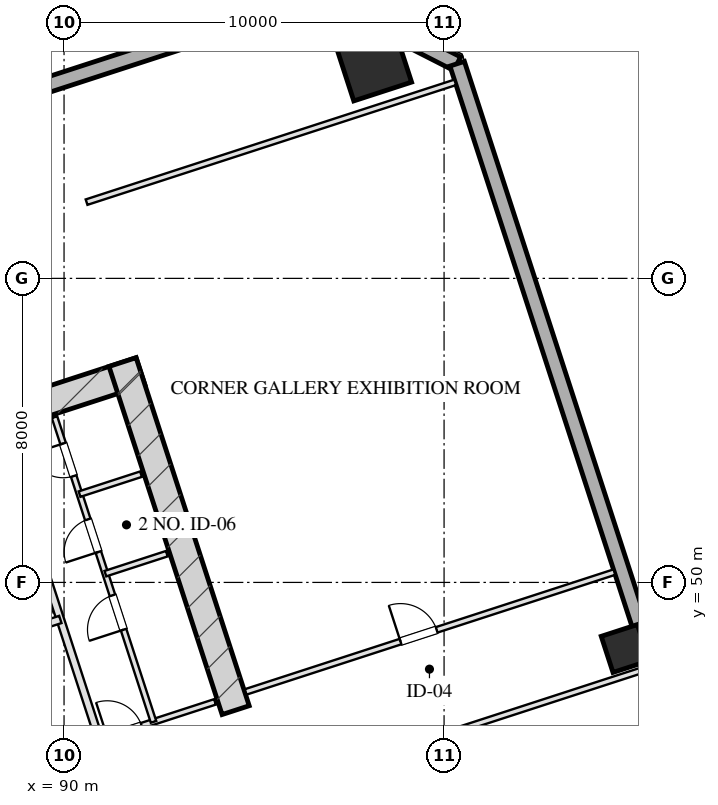
"""IFC4 building model, lengths in metres.
Left out: names, types, materials, properties, quantities, classifications, styles, units other than length and angle.
Written with IfcOpenShell. Run it as: python <this file> out.ifc"""

import sys

from ifc_helpers import new_model, si_unit, direction, frame, frame_2d, origin, origin_2d, place, context, subcontext, project, spatial, rectangle, hollow_rectangle, extrude, element, fill, save


model = new_model("IFC4")
c1 = context("Model", 3, precision=1e-05, world=origin(), true_north=direction((0.0, 1.0)))
c2 = subcontext(c1, "Body", "Model", "MODEL_VIEW")
j1 = project(units=[si_unit("LENGTHUNIT", "METRE"), si_unit("PLANEANGLEUNIT", "RADIAN")], contexts=[c1])
p1 = place(None, origin())
s1 = spatial("IfcSite", under=j1, at=p1, CompositionType="ELEMENT")
p2 = place(p1, origin())
s2 = spatial("IfcBuilding", under=s1, at=p2, CompositionType="ELEMENT")
p3 = place(p2, frame((0.0, 0.0, 30.0)))
s3 = spatial("IfcBuildingStorey", under=s2, at=p3, CompositionType="ELEMENT", Elevation=30.0)
p4 = place(p3, frame((76.272, 50.443, 0.0), z_axis=(0.0, 0.0, 1.0), x_axis=(0.951056072937, 0.309018358888, 0.0)))
e1 = element("IfcWall", 1, at=p4, inside=s3, PredefinedType="SHEAR", context=c2, shape_type="SweptSolid", body=[
    extrude(rectangle(XDim=16.55, YDim=0.75, at=frame_2d((8.275, 0.0))), origin(), (0.0, 0.0, 1.0), 4.0),
])
p5 = place(p3, frame((94.515, 46.639, 0.0), z_axis=(0.0, 0.0, 1.0), x_axis=(-0.309016134813, 0.951056795583, 0.0)))
e2 = element("IfcWall", 2, at=p5, inside=s3, PredefinedType="SHEAR", context=c2, shape_type="SweptSolid", body=[
    extrude(rectangle(XDim=9.63, YDim=0.75, at=frame_2d((4.815, 0.0))), origin(), (0.0, 0.0, 1.0), 4.0),
])
p6 = place(p3, frame((98.137, 63.677, 0.0), z_axis=(0.0, 0.0, 1.0), x_axis=(0.951056516295, 0.309016994375, 0.0)))
e3 = element("IfcColumn", 3, at=p6, inside=s3, PredefinedType="COLUMN", context=c2, shape_type="SweptSolid", body=[
    extrude(hollow_rectangle(XDim=1.6, YDim=1.6, WallThickness=0.055, at=origin_2d()), origin(), (0.0, 0.0, 1.0), 4.001),
])
p7 = place(p3, frame((104.766, 48.261, 0.0), z_axis=(0.0, 0.0, 1.0), x_axis=(0.951056516295, 0.309016994375, 0.0)))
e4 = element("IfcColumn", 4, at=p7, inside=s3, PredefinedType="COLUMN", context=c2, shape_type="SweptSolid", body=[
    extrude(hollow_rectangle(XDim=1.0, YDim=1.0, WallThickness=0.036, at=origin_2d()), origin(), (0.0, 0.0, 1.0), 4.001),
])
p8 = place(p3, frame((66.002, 55.433, 0.0), z_axis=(0.0, 0.0, 1.0), x_axis=(0.951055939317, 0.309018770125, 0.0)))
e5 = element("IfcWall", 5, at=p8, inside=s3, PredefinedType="SOLIDWALL", context=c2, shape_type="SweptSolid", body=[
    extrude(rectangle(XDim=32.4, YDim=0.4, at=frame_2d((16.2, 0.0))), origin(), (0.0, 0.0, 1.0), 3.16),
])
p9 = place(p3, frame((96.816, 65.446, 0.0), z_axis=(0.0, 0.0, 1.0), x_axis=(0.890998089617, -0.454007053137, 0.0)))
e6 = element("IfcWall", 6, at=p9, inside=s3, PredefinedType="SOLIDWALL", context=c2, shape_type="SweptSolid", body=[
    extrude(rectangle(XDim=3.96, YDim=0.4, at=frame_2d((1.98, 0.0))), origin(), (0.0, 0.0, 1.0), 3.16),
])
p10 = place(p3, frame((100.345, 63.648, 0.0), z_axis=(0.0, 0.0, 1.0), x_axis=(0.309014526607, -0.951057318118, 0.0)))
e7 = element("IfcWall", 7, at=p10, inside=s3, PredefinedType="SOLIDWALL", context=c2, shape_type="SweptSolid", body=[
    extrude(rectangle(XDim=50.0, YDim=0.4, at=frame_2d((25.0, 0.0))), origin(), (0.0, 0.0, 1.0), 3.16),
])
p11 = place(p10, frame((30.15, 0.0, 0.75)))
e8 = element("IfcOpeningElement", 8, at=p11, cuts=e7, PredefinedType="OPENING", context=c2, shape_type="SweptSolid", body=[
    extrude(rectangle(XDim=2.5, YDim=1.75, at=frame_2d((1.25, 0.875))), frame((0.0, 0.21, 0.0), z_axis=(0.0, -1.0, 0.0), x_axis=(1.0, 0.0, 0.0)), (0.0, 0.0, 1.0), 0.42),
])
p12 = place(p10, frame((21.15, 0.0, 0.75)))
e9 = element("IfcOpeningElement", 9, at=p12, cuts=e7, PredefinedType="OPENING", context=c2, shape_type="SweptSolid", body=[
    extrude(rectangle(XDim=2.5, YDim=1.75, at=frame_2d((1.25, 0.875))), frame((0.0, 0.21, 0.0), z_axis=(0.0, -1.0, 0.0), x_axis=(1.0, 0.0, 0.0)), (0.0, 0.0, 1.0), 0.42),
])
p13 = place(p3, frame((90.928, 45.868, 0.0), z_axis=(0.0, 0.0, 1.0), x_axis=(-0.309042196757, 0.951048327176, 0.0)))
e10 = element("IfcWall", 10, at=p13, inside=s3, PredefinedType="PARTITIONING", context=c2, shape_type="SweptSolid", body=[
    extrude(rectangle(XDim=8.43, YDim=0.2, at=frame_2d((4.215, 0.0))), origin(), (0.0, 0.0, 1.0), 3.725),
])
p14 = place(p3, frame((85.718, 47.666, 0.0), z_axis=(0.0, 0.0, 1.0), x_axis=(0.951058531764, 0.30901079133, 0.0)))
e11 = element("IfcWall", 11, at=p14, inside=s3, PredefinedType="PARTITIONING", context=c2, shape_type="SweptSolid", body=[
    extrude(rectangle(XDim=4.4, YDim=0.2, at=frame_2d((2.2, 0.0))), origin(), (0.0, 0.0, 1.0), 3.725),
])
p15 = place(p14, frame((0.45, 0.0, 0.0)))
e12 = element("IfcOpeningElement", 12, at=p15, cuts=e11, PredefinedType="OPENING", context=c2, shape_type="SweptSolid", body=[
    extrude(rectangle(XDim=1.1, YDim=2.05, at=frame_2d((0.55, 1.025))), frame((0.0, 0.11, 0.0), z_axis=(0.0, -1.0, 0.0), x_axis=(1.0, 0.0, 0.0)), (0.0, 0.0, 1.0), 0.22),
])
p16 = place(p14, frame((2.55, 0.0, 0.0)))
e13 = element("IfcOpeningElement", 13, at=p16, cuts=e11, PredefinedType="OPENING", context=c2, shape_type="SweptSolid", body=[
    extrude(rectangle(XDim=1.1, YDim=2.05, at=frame_2d((0.55, 1.025))), frame((0.0, 0.11, 0.0), z_axis=(0.0, -1.0, 0.0), x_axis=(1.0, 0.0, 0.0)), (0.0, 0.0, 1.0), 0.22),
])
p17 = place(p3, frame((90.928, 45.868, 0.0), z_axis=(0.0, 0.0, 1.0), x_axis=(0.951059297078, 0.309008435874, 0.0)))
e14 = element("IfcWall", 14, at=p17, inside=s3, PredefinedType="PARTITIONING", context=c2, shape_type="SweptSolid", body=[
    extrude(rectangle(XDim=3.2, YDim=0.15, at=frame_2d((1.6, 0.0))), origin(), (0.0, 0.0, 1.0), 3.725),
])
p18 = place(p17, frame((0.22, 0.0, 0.0)))
e15 = element("IfcOpeningElement", 15, at=p18, cuts=e14, PredefinedType="OPENING", context=c2, shape_type="SweptSolid", body=[
    extrude(rectangle(XDim=0.95, YDim=2.05, at=frame_2d((0.475, 1.025))), frame((0.0, 0.085, 0.0), z_axis=(0.0, -1.0, 0.0), x_axis=(1.0, 0.0, 0.0)), (0.0, 0.0, 1.0), 0.17),
])
p19 = place(p3, frame((92.355, 46.331, 0.0), z_axis=(0.0, 0.0, 1.0), x_axis=(-0.309007490203, 0.951059604335, 0.0)))
e16 = element("IfcWall", 16, at=p19, inside=s3, PredefinedType="PARTITIONING", context=c2, shape_type="SweptSolid", body=[
    extrude(rectangle(XDim=8.43, YDim=0.15, at=frame_2d((4.215, 0.0))), origin(), (0.0, 0.0, 1.0), 3.725),
])
p20 = place(p19, frame((2.55, 0.0, 0.0)))
e17 = element("IfcOpeningElement", 17, at=p20, cuts=e16, PredefinedType="OPENING", context=c2, shape_type="SweptSolid", body=[
    extrude(rectangle(XDim=0.95, YDim=2.05, at=frame_2d((0.475, 1.025))), frame((0.0, 0.085, 0.0), z_axis=(0.0, -1.0, 0.0), x_axis=(1.0, 0.0, 0.0)), (0.0, 0.0, 1.0), 0.17),
])
p21 = place(p19, frame((4.7, 0.0, 0.0)))
e18 = element("IfcOpeningElement", 18, at=p21, cuts=e16, PredefinedType="OPENING", context=c2, shape_type="SweptSolid", body=[
    extrude(rectangle(XDim=0.9, YDim=2.05, at=frame_2d((0.45, 1.025))), frame((0.0, 0.085, 0.0), z_axis=(0.0, -1.0, 0.0), x_axis=(1.0, 0.0, 0.0)), (0.0, 0.0, 1.0), 0.17),
])
p22 = place(p19, frame((6.8, 0.0, 0.0)))
e19 = element("IfcOpeningElement", 19, at=p22, cuts=e16, PredefinedType="OPENING", context=c2, shape_type="SweptSolid", body=[
    extrude(rectangle(XDim=0.9, YDim=2.05, at=frame_2d((0.45, 1.025))), frame((0.0, 0.085, 0.0), z_axis=(0.0, -1.0, 0.0), x_axis=(1.0, 0.0, 0.0)), (0.0, 0.0, 1.0), 0.17),
])
p23 = place(p3, frame((91.088, 50.23, 0.0), z_axis=(0.0, 0.0, 1.0), x_axis=(0.951054116971, 0.309024378638, 0.0)))
e20 = element("IfcWall", 20, at=p23, inside=s3, PredefinedType="PARTITIONING", context=c2, shape_type="SweptSolid", body=[
    extrude(rectangle(XDim=1.7, YDim=0.15, at=frame_2d((0.85, 0.0))), origin(), (0.0, 0.0, 1.0), 3.725),
])
p24 = place(p3, frame((90.408, 52.323, 0.0), z_axis=(0.0, 0.0, 1.0), x_axis=(0.951040401051, 0.309066587596, 0.0)))
e21 = element("IfcWall", 21, at=p24, inside=s3, PredefinedType="PARTITIONING", context=c2, shape_type="SweptSolid", body=[
    extrude(rectangle(XDim=1.7, YDim=0.15, at=frame_2d((0.85, 0.0))), origin(), (0.0, 0.0, 1.0), 3.725),
])
p25 = place(p3, frame((90.593, 60.006, 0.0), z_axis=(0.0, 0.0, 1.0), x_axis=(0.951059043131, 0.309009217467, 0.0)))
e22 = element("IfcWall", 22, at=p25, inside=s3, PredefinedType="PARTITIONING", context=c2, shape_type="SweptSolid", body=[
    extrude(rectangle(XDim=10.2, YDim=0.15, at=frame_2d((5.1, 0.0))), origin(), (0.0, 0.0, 1.0), 3.725),
])
p26 = place(p3, frame((94.78, 47.119, 0.0), z_axis=(0.0, 0.0, 1.0), x_axis=(0.951054294345, 0.309023832749, 0.0)))
e23 = element("IfcWall", 23, at=p26, inside=s3, PredefinedType="PARTITIONING", context=c2, shape_type="SweptSolid", body=[
    extrude(rectangle(XDim=10.2, YDim=0.15, at=frame_2d((5.1, 0.0))), origin(), (0.0, 0.0, 1.0), 3.725),
])
p27 = place(p26, frame((4.284, 0.0, 0.0)))
e24 = element("IfcOpeningElement", 24, at=p27, cuts=e23, PredefinedType="OPENING", context=c2, shape_type="SweptSolid", body=[
    extrude(rectangle(XDim=1.0, YDim=2.05, at=frame_2d((0.5, 1.025))), frame((0.0, 0.085, 0.0), z_axis=(0.0, -1.0, 0.0), x_axis=(1.0, 0.0, 0.0)), (0.0, 0.0, 1.0), 0.17),
])
p28 = place(p3, frame((86.692, 41.673, 0.0), z_axis=(0.0, 0.0, 1.0), x_axis=(0.951055605195, 0.309019798438, 0.0)))
e25 = element("IfcWall", 25, at=p28, inside=s3, PredefinedType="PARTITIONING", context=c2, shape_type="SweptSolid", body=[
    extrude(rectangle(XDim=19.575, YDim=0.15, at=frame_2d((9.788, 0.0))), origin(), (0.0, 0.0, 1.0), 3.725),
])
p29 = place(p18, origin())
e26 = element("IfcDoor", 26, at=p29, inside=s3, OperationType="SINGLE_SWING_LEFT", PredefinedType="DOOR", context=c2, shape_type="SweptSolid", body=[
    extrude(rectangle(XDim=0.95, YDim=2.05, at=frame_2d((0.475, 1.025))), frame((0.0, 0.025, 0.0), z_axis=(0.0, -1.0, 0.0), x_axis=(1.0, 0.0, 0.0)), (0.0, 0.0, 1.0), 0.05),
])
fill(e15, e26)
p30 = place(p20, origin())
e27 = element("IfcDoor", 27, at=p30, inside=s3, OperationType="SINGLE_SWING_LEFT", PredefinedType="DOOR", context=c2, shape_type="SweptSolid", body=[
    extrude(rectangle(XDim=0.95, YDim=2.05, at=frame_2d((0.475, 1.025))), frame((0.0, 0.025, 0.0), z_axis=(0.0, -1.0, 0.0), x_axis=(1.0, 0.0, 0.0)), (0.0, 0.0, 1.0), 0.05),
])
fill(e17, e27)
p31 = place(p21, origin())
e28 = element("IfcDoor", 28, at=p31, inside=s3, OperationType="SINGLE_SWING_LEFT", PredefinedType="DOOR", context=c2, shape_type="SweptSolid", body=[
    extrude(rectangle(XDim=0.9, YDim=2.05, at=frame_2d((0.45, 1.025))), frame((0.0, 0.025, 0.0), z_axis=(0.0, -1.0, 0.0), x_axis=(1.0, 0.0, 0.0)), (0.0, 0.0, 1.0), 0.05),
])
fill(e18, e28)
p32 = place(p22, origin())
e29 = element("IfcDoor", 29, at=p32, inside=s3, OperationType="SINGLE_SWING_RIGHT", PredefinedType="DOOR", context=c2, shape_type="SweptSolid", body=[
    extrude(rectangle(XDim=0.9, YDim=2.05, at=frame_2d((0.45, 1.025))), frame((0.0, 0.025, 0.0), z_axis=(0.0, -1.0, 0.0), x_axis=(1.0, 0.0, 0.0)), (0.0, 0.0, 1.0), 0.05),
])
fill(e19, e29)
p33 = place(p27, origin())
e30 = element("IfcDoor", 30, at=p33, inside=s3, OperationType="SINGLE_SWING_LEFT", PredefinedType="DOOR", context=c2, shape_type="SweptSolid", body=[
    extrude(rectangle(XDim=1.0, YDim=2.05, at=frame_2d((0.5, 1.025))), frame((0.0, 0.025, 0.0), z_axis=(0.0, -1.0, 0.0), x_axis=(1.0, 0.0, 0.0)), (0.0, 0.0, 1.0), 0.05),
])
fill(e24, e30)
save(model, sys.argv[1])
